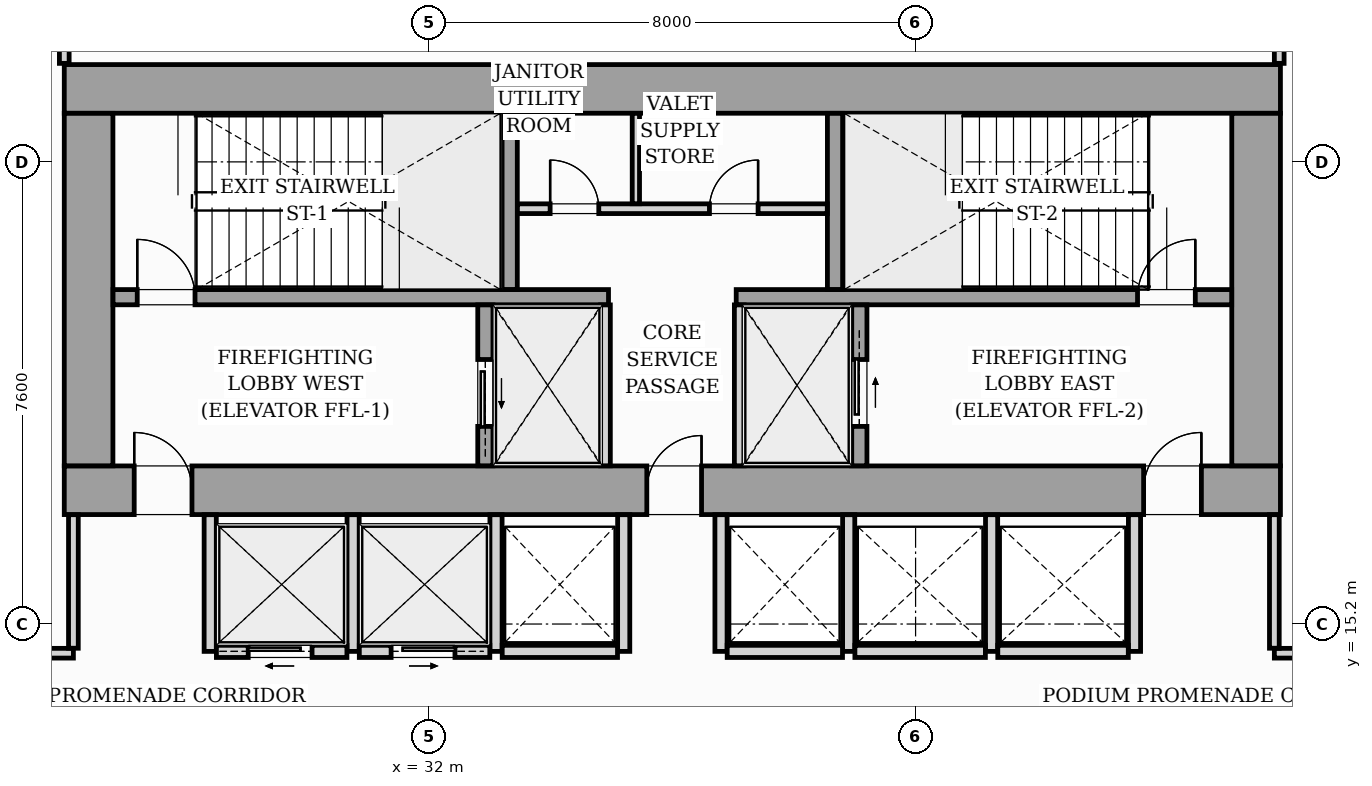
"""IFC4 building model, lengths in metres.
Left out: names, types, materials, properties, quantities, classifications, styles, units other than length and angle.
Written with IfcOpenShell. Run it as: python <this file> out.ifc"""

import sys

from ifc_helpers import new_model, si_unit, direction, frame, frame_2d, origin, origin_2d, place, context, subcontext, project, spatial, rectangle, i_section, extrude, source, transform, mapped, element, fill, save


model = new_model("IFC4")
c1 = context("Model", 3, precision=1e-05, world=origin(), true_north=direction((0.0, 1.0)))
c2 = subcontext(c1, "Body", "Model", "MODEL_VIEW")
j1 = project(units=[si_unit("LENGTHUNIT", "METRE"), si_unit("PLANEANGLEUNIT", "RADIAN")], contexts=[c1])
p1 = place(None, origin())
s1 = spatial("IfcSite", under=j1, at=p1, CompositionType="ELEMENT")
p2 = place(p1, origin())
s2 = spatial("IfcBuilding", under=s1, at=p2, CompositionType="ELEMENT")
p3 = place(p2, frame((0.0, 0.0, 18.5)))
s3 = spatial("IfcBuildingStorey", under=s2, at=p3, CompositionType="ELEMENT", Elevation=18.5)
m1 = source(origin(), c2, "Body", "SweptSolid", [
    extrude(i_section(OverallWidth=0.437, OverallDepth=0.514, WebThickness=0.061, FlangeThickness=0.097, FilletRadius=0.018, at=origin_2d()), origin(), (0.0, 0.0, 1.0), 4.496),
])
for number, where, z_axis, x_axis in (
    (1, (26.4, 17.4, 0.002), (0.0, 0.0, 1.0), (1.0, 0.0, 0.0)),
    (2, (33.12, 17.4, 0.002), (0.0, 0.0, 1.0), (1.0, 0.0, 0.0)),
    (3, (38.88, 17.4, 0.002), (0.0, 0.0, 1.0), (1.0, 0.0, 0.0)),
    (4, (45.6, 17.4, 0.002), (0.0, 0.0, 1.0), (1.0, 0.0, 0.0)),
    (5, (26.4, 24.0, 0.002), (0.0, 0.0, 1.0), (1.0, 0.0, 0.0)),
    (6, (33.12, 24.0, 0.002), (0.0, 0.0, 1.0), (1.0, 0.0, 0.0)),
    (7, (38.88, 24.0, 0.002), (0.0, 0.0, 1.0), (1.0, 0.0, 0.0)),
    (8, (45.6, 24.0, 0.002), (0.0, 0.0, 1.0), (1.0, 0.0, 0.0)),
):
    element("IfcColumn", number, at=place(p3, frame(where, z_axis=z_axis, x_axis=x_axis)), inside=s3, PredefinedType="PILASTER", context=c2, shape_type="MappedRepresentation", body=[
        mapped(m1, transform((0.0, 0.0, 0.0), scale=1.0)),
    ])
p4 = place(p3, frame((26.0, 17.4, 0.0), z_axis=(0.0, 0.0, 1.0), x_axis=(1.0, 0.0, 0.0)))
e9 = element("IfcWall", 9, at=p4, inside=s3, PredefinedType="SHEAR", context=c2, shape_type="SweptSolid", body=[
    extrude(rectangle(XDim=20.0, YDim=0.8, at=frame_2d((10.0, 0.0))), origin(), (0.0, 0.0, 1.0), 4.5),
])
p5 = place(p4, frame((1.15, 0.0, 0.0)))
e10 = element("IfcOpeningElement", 10, at=p5, cuts=e9, PredefinedType="OPENING", context=c2, shape_type="SweptSolid", body=[
    extrude(rectangle(XDim=0.95, YDim=2.06, at=frame_2d((0.475, 1.03))), frame((0.0, 0.41, 0.0), z_axis=(0.0, -1.0, 0.0), x_axis=(1.0, 0.0, 0.0)), (0.0, 0.0, 1.0), 0.82),
])
p6 = place(p4, frame((9.58, 0.0, 0.0)))
e11 = element("IfcOpeningElement", 11, at=p6, cuts=e9, PredefinedType="OPENING", context=c2, shape_type="SweptSolid", body=[
    extrude(rectangle(XDim=0.9, YDim=2.06, at=frame_2d((0.45, 1.03))), frame((0.0, 0.41, 0.0), z_axis=(0.0, -1.0, 0.0), x_axis=(1.0, 0.0, 0.0)), (0.0, 0.0, 1.0), 0.82),
])
p7 = place(p4, frame((17.75, 0.0, 0.0)))
e12 = element("IfcOpeningElement", 12, at=p7, cuts=e9, PredefinedType="OPENING", context=c2, shape_type="SweptSolid", body=[
    extrude(rectangle(XDim=0.95, YDim=2.06, at=frame_2d((0.475, 1.03))), frame((0.0, 0.41, 0.0), z_axis=(0.0, -1.0, 0.0), x_axis=(1.0, 0.0, 0.0)), (0.0, 0.0, 1.0), 0.82),
])
p8 = place(p3, frame((26.0, 24.0, 0.0), z_axis=(0.0, 0.0, 1.0), x_axis=(1.0, 0.0, 0.0)))
e13 = element("IfcWall", 13, at=p8, inside=s3, PredefinedType="SHEAR", context=c2, shape_type="SweptSolid", body=[
    extrude(rectangle(XDim=20.0, YDim=0.8, at=frame_2d((10.0, 0.0))), origin(), (0.0, 0.0, 1.0), 4.5),
])
for number, where, z_axis, x_axis in (
    (14, (26.4, 17.802, 0.0), (0.0, 0.0, 1.0), (0.0, 1.0, 0.0)),
    (15, (45.6, 17.802, 0.0), (0.0, 0.0, 1.0), (0.0, 1.0, 0.0)),
):
    element("IfcWall", number, at=place(p3, frame(where, z_axis=z_axis, x_axis=x_axis)), inside=s3, PredefinedType="SHEAR", context=c2, shape_type="SweptSolid", body=[
        extrude(rectangle(XDim=5.796, YDim=0.8, at=frame_2d((2.898, 0.0))), origin(), (0.0, 0.0, 1.0), 4.5),
    ])
p9 = place(p3, frame((26.802, 20.575, 0.0), z_axis=(0.0, 0.0, 1.0), x_axis=(1.0, 0.0, 0.0)))
e16 = element("IfcWall", 16, at=p9, inside=s3, PredefinedType="SOLIDWALL", context=c2, shape_type="SweptSolid", body=[
    extrude(rectangle(XDim=8.148, YDim=0.25, at=frame_2d((4.074, 0.0))), origin(), (0.0, 0.0, 1.0), 4.5),
])
p10 = place(p9, frame((0.398, 0.0, 0.0)))
e17 = element("IfcOpeningElement", 17, at=p10, cuts=e16, PredefinedType="OPENING", context=c2, shape_type="SweptSolid", body=[
    extrude(rectangle(XDim=0.95, YDim=2.06, at=frame_2d((0.475, 1.03))), frame((0.0, 0.135, 0.0), z_axis=(0.0, -1.0, 0.0), x_axis=(1.0, 0.0, 0.0)), (0.0, 0.0, 1.0), 0.27),
])
p11 = place(p3, frame((37.05, 20.575, 0.0), z_axis=(0.0, 0.0, 1.0), x_axis=(1.0, 0.0, 0.0)))
e18 = element("IfcWall", 18, at=p11, inside=s3, PredefinedType="SOLIDWALL", context=c2, shape_type="SweptSolid", body=[
    extrude(rectangle(XDim=8.148, YDim=0.25, at=frame_2d((4.074, 0.0))), origin(), (0.0, 0.0, 1.0), 4.5),
])
p12 = place(p11, frame((6.6, 0.0, 0.0)))
e19 = element("IfcOpeningElement", 19, at=p12, cuts=e18, PredefinedType="OPENING", context=c2, shape_type="SweptSolid", body=[
    extrude(rectangle(XDim=0.95, YDim=2.06, at=frame_2d((0.475, 1.03))), frame((0.0, 0.135, 0.0), z_axis=(0.0, -1.0, 0.0), x_axis=(1.0, 0.0, 0.0)), (0.0, 0.0, 1.0), 0.27),
])
for number, where, z_axis, x_axis in (
    (20, (33.325, 20.702, 0.0), (0.0, 0.0, 1.0), (0.0, 1.0, 0.0)),
    (21, (38.675, 20.702, 0.0), (0.0, 0.0, 1.0), (0.0, 1.0, 0.0)),
):
    element("IfcWall", number, at=place(p3, frame(where, z_axis=z_axis, x_axis=x_axis)), inside=s3, PredefinedType="SOLIDWALL", context=c2, shape_type="SweptSolid", body=[
        extrude(rectangle(XDim=2.896, YDim=0.25, at=frame_2d((1.448, 0.0))), origin(), (0.0, 0.0, 1.0), 4.5),
    ])
p13 = place(p3, frame((32.925, 17.802, 0.0), z_axis=(0.0, 0.0, 1.0), x_axis=(0.0, 1.0, 0.0)))
e22 = element("IfcWall", 22, at=p13, inside=s3, PredefinedType="SOLIDWALL", context=c2, shape_type="SweptSolid", body=[
    extrude(rectangle(XDim=2.646, YDim=0.25, at=frame_2d((1.323, 0.0))), origin(), (0.0, 0.0, 1.0), 4.5),
])
p14 = place(p13, frame((0.648, 0.0, 0.0)))
e23 = element("IfcOpeningElement", 23, at=p14, cuts=e22, PredefinedType="OPENING", context=c2, shape_type="SweptSolid", body=[
    extrude(rectangle(XDim=1.1, YDim=2.08, at=frame_2d((0.55, 1.04))), frame((0.0, 0.135, 0.0), z_axis=(0.0, -1.0, 0.0), x_axis=(1.0, 0.0, 0.0)), (0.0, 0.0, 1.0), 0.27),
])
for number, where, z_axis, x_axis in (
    (24, (34.9, 17.802, 0.0), (0.0, 0.0, 1.0), (0.0, 1.0, 0.0)),
    (25, (37.1, 17.802, 0.0), (0.0, 0.0, 1.0), (0.0, 1.0, 0.0)),
):
    element("IfcWall", number, at=place(p3, frame(where, z_axis=z_axis, x_axis=x_axis)), inside=s3, PredefinedType="PARTITIONING", context=c2, shape_type="SweptSolid", body=[
        extrude(rectangle(XDim=2.646, YDim=0.16, at=frame_2d((1.323, 0.0))), origin(), (0.0, 0.0, 1.0), 4.08),
    ])
p15 = place(p3, frame((39.075, 17.802, 0.0), z_axis=(0.0, 0.0, 1.0), x_axis=(0.0, 1.0, 0.0)))
e26 = element("IfcWall", 26, at=p15, inside=s3, PredefinedType="SOLIDWALL", context=c2, shape_type="SweptSolid", body=[
    extrude(rectangle(XDim=2.646, YDim=0.25, at=frame_2d((1.323, 0.0))), origin(), (0.0, 0.0, 1.0), 4.5),
])
p16 = place(p15, frame((0.648, 0.0, 0.0)))
e27 = element("IfcOpeningElement", 27, at=p16, cuts=e26, PredefinedType="OPENING", context=c2, shape_type="SweptSolid", body=[
    extrude(rectangle(XDim=1.1, YDim=2.08, at=frame_2d((0.55, 1.04))), frame((0.0, 0.135, 0.0), z_axis=(0.0, -1.0, 0.0), x_axis=(1.0, 0.0, 0.0)), (0.0, 0.0, 1.0), 0.27),
])
p17 = place(p3, frame((33.452, 22.03, 0.0), z_axis=(0.0, 0.0, 1.0), x_axis=(1.0, 0.0, 0.0)))
e28 = element("IfcWall", 28, at=p17, inside=s3, PredefinedType="PARTITIONING", context=c2, shape_type="SweptSolid", body=[
    extrude(rectangle(XDim=5.096, YDim=0.16, at=frame_2d((2.548, 0.0))), origin(), (0.0, 0.0, 1.0), 4.08),
])
p18 = place(p17, frame((0.538, 0.0, 0.0)))
e29 = element("IfcOpeningElement", 29, at=p18, cuts=e28, PredefinedType="OPENING", context=c2, shape_type="SweptSolid", body=[
    extrude(rectangle(XDim=0.8, YDim=2.05, at=frame_2d((0.4, 1.025))), frame((0.0, 0.09, 0.0), z_axis=(0.0, -1.0, 0.0), x_axis=(1.0, 0.0, 0.0)), (0.0, 0.0, 1.0), 0.18),
])
p19 = place(p17, frame((3.158, 0.0, 0.0)))
e30 = element("IfcOpeningElement", 30, at=p19, cuts=e28, PredefinedType="OPENING", context=c2, shape_type="SweptSolid", body=[
    extrude(rectangle(XDim=0.8, YDim=2.05, at=frame_2d((0.4, 1.025))), frame((0.0, 0.09, 0.0), z_axis=(0.0, -1.0, 0.0), x_axis=(1.0, 0.0, 0.0)), (0.0, 0.0, 1.0), 0.18),
])
p20 = place(p3, frame((35.4, 22.112, 0.0), z_axis=(0.0, 0.0, 1.0), x_axis=(0.0, 1.0, 0.0)))
e31 = element("IfcWall", 31, at=p20, inside=s3, PredefinedType="PARTITIONING", context=c2, shape_type="SweptSolid", body=[
    extrude(rectangle(XDim=1.486, YDim=0.12, at=frame_2d((0.743, 0.0))), origin(), (0.0, 0.0, 1.0), 4.08),
])
for number, where, z_axis, x_axis in (
    (32, (28.4, 14.75, 0.0), (0.0, 0.0, 1.0), (0.0, 1.0, 0.0)),
    (33, (30.75, 14.75, 0.0), (0.0, 0.0, 1.0), (0.0, 1.0, 0.0)),
    (34, (33.1, 14.75, 0.0), (0.0, 0.0, 1.0), (0.0, 1.0, 0.0)),
):
    element("IfcWall", number, at=place(p3, frame(where, z_axis=z_axis, x_axis=x_axis)), inside=s3, PredefinedType="PARTITIONING", context=c2, shape_type="SweptSolid", body=[
        extrude(rectangle(XDim=2.248, YDim=0.2, at=frame_2d((1.124, 0.0))), origin(), (0.0, 0.0, 1.0), 4.08),
    ])
p21 = place(p3, frame((28.502, 14.75, 0.0), z_axis=(0.0, 0.0, 1.0), x_axis=(1.0, 0.0, 0.0)))
e35 = element("IfcWall", 35, at=p21, inside=s3, PredefinedType="PARTITIONING", context=c2, shape_type="SweptSolid", body=[
    extrude(rectangle(XDim=2.146, YDim=0.2, at=frame_2d((1.073, 0.0))), origin(), (0.0, 0.0, 1.0), 4.08),
])
p22 = place(p21, frame((0.523, 0.0, 0.0)))
e36 = element("IfcOpeningElement", 36, at=p22, cuts=e35, PredefinedType="OPENING", context=c2, shape_type="SweptSolid", body=[
    extrude(rectangle(XDim=1.05, YDim=2.08, at=frame_2d((0.525, 1.04))), frame((0.0, 0.11, 0.0), z_axis=(0.0, -1.0, 0.0), x_axis=(1.0, 0.0, 0.0)), (0.0, 0.0, 1.0), 0.22),
])
p23 = place(p3, frame((30.852, 14.75, 0.0), z_axis=(0.0, 0.0, 1.0), x_axis=(1.0, 0.0, 0.0)))
e37 = element("IfcWall", 37, at=p23, inside=s3, PredefinedType="PARTITIONING", context=c2, shape_type="SweptSolid", body=[
    extrude(rectangle(XDim=2.146, YDim=0.2, at=frame_2d((1.073, 0.0))), origin(), (0.0, 0.0, 1.0), 4.08),
])
p24 = place(p23, frame((0.523, 0.0, 0.0)))
e38 = element("IfcOpeningElement", 38, at=p24, cuts=e37, PredefinedType="OPENING", context=c2, shape_type="SweptSolid", body=[
    extrude(rectangle(XDim=1.05, YDim=2.08, at=frame_2d((0.525, 1.04))), frame((0.0, 0.11, 0.0), z_axis=(0.0, -1.0, 0.0), x_axis=(1.0, 0.0, 0.0)), (0.0, 0.0, 1.0), 0.22),
])
p25 = place(p3, frame((35.2, 14.75, 0.0), z_axis=(0.0, 0.0, 1.0), x_axis=(0.0, 1.0, 0.0)))
e39 = element("IfcWall", 39, at=p25, inside=s3, PredefinedType="PARTITIONING", context=c2, shape_type="SweptSolid", body=[
    extrude(rectangle(XDim=2.248, YDim=0.2, at=frame_2d((1.124, 0.0))), origin(), (0.0, 0.0, 1.0), 4.08),
])
p26 = place(p3, frame((33.202, 14.75, 0.0), z_axis=(0.0, 0.0, 1.0), x_axis=(1.0, 0.0, 0.0)))
e40 = element("IfcWall", 40, at=p26, inside=s3, PredefinedType="PARTITIONING", context=c2, shape_type="SweptSolid", body=[
    extrude(rectangle(XDim=1.896, YDim=0.2, at=frame_2d((0.948, 0.0))), origin(), (0.0, 0.0, 1.0), 4.08),
])
for number, where, z_axis, x_axis in (
    (41, (36.8, 14.75, 0.0), (0.0, 0.0, 1.0), (0.0, 1.0, 0.0)),
    (42, (38.9, 14.75, 0.0), (0.0, 0.0, 1.0), (0.0, 1.0, 0.0)),
):
    element("IfcWall", number, at=place(p3, frame(where, z_axis=z_axis, x_axis=x_axis)), inside=s3, PredefinedType="PARTITIONING", context=c2, shape_type="SweptSolid", body=[
        extrude(rectangle(XDim=2.248, YDim=0.2, at=frame_2d((1.124, 0.0))), origin(), (0.0, 0.0, 1.0), 4.08),
    ])
p27 = place(p3, frame((36.902, 14.75, 0.0), z_axis=(0.0, 0.0, 1.0), x_axis=(1.0, 0.0, 0.0)))
e43 = element("IfcWall", 43, at=p27, inside=s3, PredefinedType="PARTITIONING", context=c2, shape_type="SweptSolid", body=[
    extrude(rectangle(XDim=1.896, YDim=0.2, at=frame_2d((0.948, 0.0))), origin(), (0.0, 0.0, 1.0), 4.08),
])
for number, where, z_axis, x_axis in (
    (44, (41.25, 14.75, 0.0), (0.0, 0.0, 1.0), (0.0, 1.0, 0.0)),
    (45, (43.6, 14.75, 0.0), (0.0, 0.0, 1.0), (0.0, 1.0, 0.0)),
):
    element("IfcWall", number, at=place(p3, frame(where, z_axis=z_axis, x_axis=x_axis)), inside=s3, PredefinedType="PARTITIONING", context=c2, shape_type="SweptSolid", body=[
        extrude(rectangle(XDim=2.248, YDim=0.2, at=frame_2d((1.124, 0.0))), origin(), (0.0, 0.0, 1.0), 4.08),
    ])
for number, where, z_axis, x_axis in (
    (46, (39.002, 14.75, 0.0), (0.0, 0.0, 1.0), (1.0, 0.0, 0.0)),
    (47, (41.352, 14.75, 0.0), (0.0, 0.0, 1.0), (1.0, 0.0, 0.0)),
):
    element("IfcWall", number, at=place(p3, frame(where, z_axis=z_axis, x_axis=x_axis)), inside=s3, PredefinedType="PARTITIONING", context=c2, shape_type="SweptSolid", body=[
        extrude(rectangle(XDim=2.146, YDim=0.2, at=frame_2d((1.073, 0.0))), origin(), (0.0, 0.0, 1.0), 4.08),
    ])
p28 = place(p3, frame((4.55, 14.72, 0.0), z_axis=(0.0, 0.0, 1.0), x_axis=(1.0, 0.0, 0.0)))
e48 = element("IfcWall", 48, at=p28, inside=s3, PredefinedType="PARTITIONING", context=c2, shape_type="SweptSolid", body=[
    extrude(rectangle(XDim=21.6, YDim=0.16, at=frame_2d((10.8, 0.0))), origin(), (0.0, 0.0, 1.0), 4.08),
])
p29 = place(p28, frame((16.5, 0.0, 0.0)))
e49 = element("IfcOpeningElement", 49, at=p29, cuts=e48, PredefinedType="OPENING", context=c2, shape_type="SweptSolid", body=[
    extrude(rectangle(XDim=0.95, YDim=2.06, at=frame_2d((0.475, 1.03))), frame((0.0, 0.09, 0.0), z_axis=(0.0, -1.0, 0.0), x_axis=(1.0, 0.0, 0.0)), (0.0, 0.0, 1.0), 0.18),
])
p30 = place(p28, frame((3.6, 0.0, 0.0)))
e50 = element("IfcOpeningElement", 50, at=p30, cuts=e48, PredefinedType="OPENING", context=c2, shape_type="SweptSolid", body=[
    extrude(rectangle(XDim=0.9, YDim=2.05, at=frame_2d((0.45, 1.025))), frame((0.0, 0.09, 0.0), z_axis=(0.0, -1.0, 0.0), x_axis=(1.0, 0.0, 0.0)), (0.0, 0.0, 1.0), 0.18),
])
p31 = place(p28, frame((6.8, 0.0, 0.0)))
e51 = element("IfcOpeningElement", 51, at=p31, cuts=e48, PredefinedType="OPENING", context=c2, shape_type="SweptSolid", body=[
    extrude(rectangle(XDim=0.9, YDim=2.05, at=frame_2d((0.45, 1.025))), frame((0.0, 0.09, 0.0), z_axis=(0.0, -1.0, 0.0), x_axis=(1.0, 0.0, 0.0)), (0.0, 0.0, 1.0), 0.18),
])
p32 = place(p28, frame((11.8, 0.0, 0.0)))
e52 = element("IfcOpeningElement", 52, at=p32, cuts=e48, PredefinedType="OPENING", context=c2, shape_type="SweptSolid", body=[
    extrude(rectangle(XDim=0.95, YDim=2.1, at=frame_2d((0.475, 1.05))), frame((0.0, 0.09, 0.0), z_axis=(0.0, -1.0, 0.0), x_axis=(1.0, 0.0, 0.0)), (0.0, 0.0, 1.0), 0.18),
])
p33 = place(p3, frame((45.9, 14.72, 0.0), z_axis=(0.0, 0.0, 1.0), x_axis=(1.0, 0.0, 0.0)))
e53 = element("IfcWall", 53, at=p33, inside=s3, PredefinedType="PARTITIONING", context=c2, shape_type="SweptSolid", body=[
    extrude(rectangle(XDim=21.398, YDim=0.16, at=frame_2d((10.699, 0.0))), origin(), (0.0, 0.0, 1.0), 4.08),
])
p34 = place(p33, frame((5.0, 0.0, 0.0)))
e54 = element("IfcOpeningElement", 54, at=p34, cuts=e53, PredefinedType="OPENING", context=c2, shape_type="SweptSolid", body=[
    extrude(rectangle(XDim=1.4, YDim=2.08, at=frame_2d((0.7, 1.04))), frame((0.0, 0.09, 0.0), z_axis=(0.0, -1.0, 0.0), x_axis=(1.0, 0.0, 0.0)), (0.0, 0.0, 1.0), 0.18),
])
for number, where, z_axis, x_axis in (
    (55, (26.0, 24.42, 0.0), (0.0, 0.0, 1.0), (0.0, 1.0, 0.0)),
    (56, (45.98, 24.42, 0.0), (0.0, 0.0, 1.0), (0.0, 1.0, 0.0)),
):
    element("IfcWall", number, at=place(p3, frame(where, z_axis=z_axis, x_axis=x_axis)), inside=s3, PredefinedType="PARTITIONING", context=c2, shape_type="SweptSolid", body=[
        extrude(rectangle(XDim=6.63, YDim=0.16, at=frame_2d((3.315, 0.0))), origin(), (0.0, 0.0, 1.0), 4.08),
    ])
for number, where, z_axis, x_axis in (
    (57, (26.15, 14.802, 0.0), (0.0, 0.0, 1.0), (0.0, 1.0, 0.0)),
    (58, (45.9, 14.802, 0.0), (0.0, 0.0, 1.0), (0.0, 1.0, 0.0)),
):
    element("IfcWall", number, at=place(p3, frame(where, z_axis=z_axis, x_axis=x_axis)), inside=s3, PredefinedType="PARTITIONING", context=c2, shape_type="SweptSolid", body=[
        extrude(rectangle(XDim=2.196, YDim=0.16, at=frame_2d((1.098, 0.0))), origin(), (0.0, 0.0, 1.0), 4.08),
    ])
m2 = source(origin(), c2, "Body", "SweptSolid", [
    extrude(rectangle(XDim=0.95, YDim=2.06, at=frame_2d((0.475, 1.03))), frame((0.0, 0.025, 0.0), z_axis=(0.0, -1.0, 0.0), x_axis=(1.0, 0.0, 0.0)), (0.0, 0.0, 1.0), 0.05),
])
p35 = place(p5, origin())
e59 = element("IfcDoor", 59, at=p35, inside=s3, OperationType="SINGLE_SWING_LEFT", PredefinedType="DOOR", context=c2, shape_type="MappedRepresentation", body=[
    mapped(m2, transform((0.0, 0.0, 0.0), scale=1.0)),
])
fill(e10, e59)
m3 = source(origin(), c2, "Body", "SweptSolid", [
    extrude(rectangle(XDim=0.9, YDim=2.06, at=frame_2d((0.45, 1.03))), frame((0.0, 0.025, 0.0), z_axis=(0.0, -1.0, 0.0), x_axis=(1.0, 0.0, 0.0)), (0.0, 0.0, 1.0), 0.05),
])
p36 = place(p6, origin())
e60 = element("IfcDoor", 60, at=p36, inside=s3, OperationType="SINGLE_SWING_RIGHT", PredefinedType="DOOR", context=c2, shape_type="MappedRepresentation", body=[
    mapped(m3, transform((0.0, 0.0, 0.0), scale=1.0)),
])
fill(e11, e60)
p37 = place(p7, origin())
e61 = element("IfcDoor", 61, at=p37, inside=s3, OperationType="SINGLE_SWING_RIGHT", PredefinedType="DOOR", context=c2, shape_type="MappedRepresentation", body=[
    mapped(m2, transform((0.0, 0.0, 0.0), scale=1.0)),
])
fill(e12, e61)
p38 = place(p10, origin())
e62 = element("IfcDoor", 62, at=p38, inside=s3, OperationType="SINGLE_SWING_LEFT", PredefinedType="DOOR", context=c2, shape_type="MappedRepresentation", body=[
    mapped(m2, transform((0.0, 0.0, 0.0), scale=1.0)),
])
fill(e17, e62)
p39 = place(p12, origin())
e63 = element("IfcDoor", 63, at=p39, inside=s3, OperationType="SINGLE_SWING_RIGHT", PredefinedType="DOOR", context=c2, shape_type="MappedRepresentation", body=[
    mapped(m2, transform((0.0, 0.0, 0.0), scale=1.0)),
])
fill(e19, e63)
m4 = source(origin(), c2, "Body", "SweptSolid", [
    extrude(rectangle(XDim=1.1, YDim=2.08, at=frame_2d((0.55, 1.04))), frame((0.0, 0.025, 0.0), z_axis=(0.0, -1.0, 0.0), x_axis=(1.0, 0.0, 0.0)), (0.0, 0.0, 1.0), 0.05),
])
p40 = place(p14, origin())
e64 = element("IfcDoor", 64, at=p40, inside=s3, OperationType="SLIDING_TO_LEFT", PredefinedType="DOOR", context=c2, shape_type="MappedRepresentation", body=[
    mapped(m4, transform((0.0, 0.0, 0.0), scale=1.0)),
])
fill(e23, e64)
p41 = place(p16, origin())
e65 = element("IfcDoor", 65, at=p41, inside=s3, OperationType="SLIDING_TO_RIGHT", PredefinedType="DOOR", context=c2, shape_type="MappedRepresentation", body=[
    mapped(m4, transform((0.0, 0.0, 0.0), scale=1.0)),
])
fill(e27, e65)
m5 = source(origin(), c2, "Body", "SweptSolid", [
    extrude(rectangle(XDim=0.8, YDim=2.05, at=frame_2d((0.4, 1.025))), frame((0.0, 0.025, 0.0), z_axis=(0.0, -1.0, 0.0), x_axis=(1.0, 0.0, 0.0)), (0.0, 0.0, 1.0), 0.05),
])
p42 = place(p18, origin())
e66 = element("IfcDoor", 66, at=p42, inside=s3, OperationType="SINGLE_SWING_LEFT", PredefinedType="DOOR", context=c2, shape_type="MappedRepresentation", body=[
    mapped(m5, transform((0.0, 0.0, 0.0), scale=1.0)),
])
fill(e29, e66)
p43 = place(p19, origin())
e67 = element("IfcDoor", 67, at=p43, inside=s3, OperationType="SINGLE_SWING_RIGHT", PredefinedType="DOOR", context=c2, shape_type="MappedRepresentation", body=[
    mapped(m5, transform((0.0, 0.0, 0.0), scale=1.0)),
])
fill(e30, e67)
m6 = source(origin(), c2, "Body", "SweptSolid", [
    extrude(rectangle(XDim=1.05, YDim=2.08, at=frame_2d((0.525, 1.04))), frame((0.0, 0.025, 0.0), z_axis=(0.0, -1.0, 0.0), x_axis=(1.0, 0.0, 0.0)), (0.0, 0.0, 1.0), 0.05),
])
p44 = place(p22, origin())
e68 = element("IfcDoor", 68, at=p44, inside=s3, OperationType="SLIDING_TO_LEFT", PredefinedType="DOOR", context=c2, shape_type="MappedRepresentation", body=[
    mapped(m6, transform((0.0, 0.0, 0.0), scale=1.0)),
])
fill(e36, e68)
p45 = place(p24, origin())
e69 = element("IfcDoor", 69, at=p45, inside=s3, OperationType="SLIDING_TO_RIGHT", PredefinedType="DOOR", context=c2, shape_type="MappedRepresentation", body=[
    mapped(m6, transform((0.0, 0.0, 0.0), scale=1.0)),
])
fill(e38, e69)
save(model, sys.argv[1])
